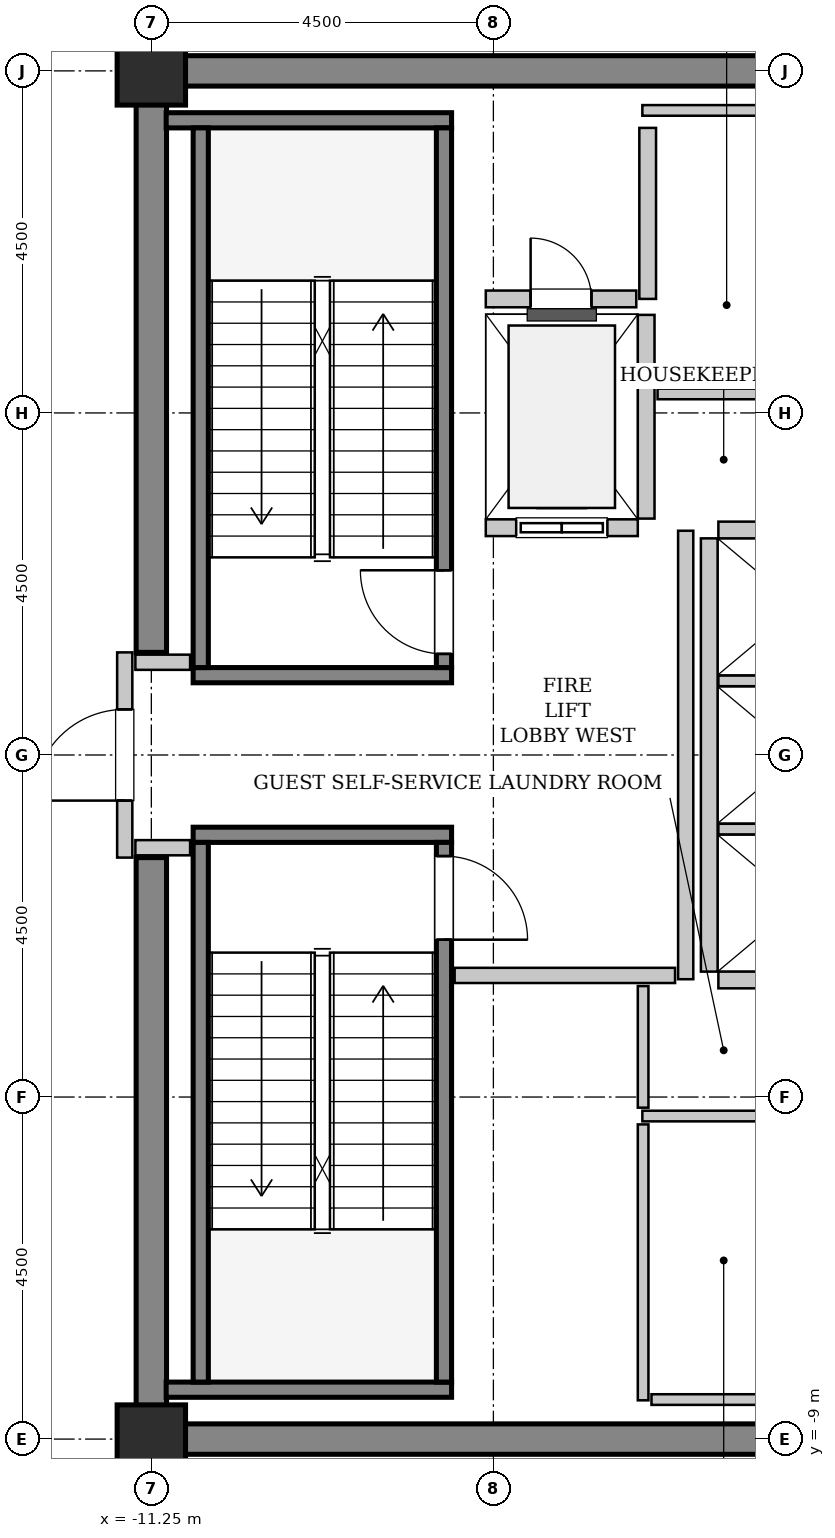
"""IFC4 building model, lengths in metres.
Left out: names, types, materials, properties, quantities, classifications, styles, units other than length and angle.
Written with IfcOpenShell. Run it as: python <this file> out.ifc"""

import sys

from ifc_helpers import new_model, si_unit, direction, frame, frame_2d, origin, origin_2d, place, context, subcontext, project, spatial, rectangle, extrude, source, transform, mapped, element, fill, save


model = new_model("IFC4")
c1 = context("Model", 3, precision=1e-05, world=origin(), true_north=direction((0.0, 1.0)))
c2 = subcontext(c1, "Body", "Model", "MODEL_VIEW")
j1 = project(units=[si_unit("LENGTHUNIT", "METRE"), si_unit("PLANEANGLEUNIT", "RADIAN")], contexts=[c1])
p1 = place(None, origin())
s1 = spatial("IfcSite", under=j1, at=p1, CompositionType="ELEMENT")
p2 = place(p1, origin())
s2 = spatial("IfcBuilding", under=s1, at=p2, CompositionType="ELEMENT")
p3 = place(p2, frame((0.0, 0.0, 349.0)))
s3 = spatial("IfcBuildingStorey", under=s2, at=p3, CompositionType="ELEMENT", Elevation=349.0)
m1 = source(origin(), c2, "Body", "SweptSolid", [
    extrude(rectangle(XDim=9.9, YDim=0.4, at=frame_2d((4.95, 0.0))), origin(), (0.0, 0.0, 1.0), 4.8),
])
for number, where, z_axis, x_axis in (
    (1, (-11.45, 9.0, 0.0), (0.0, 0.0, 1.0), (1.0, 0.0, 0.0)),
    (2, (-11.45, -9.0, 0.0), (0.0, 0.0, 1.0), (1.0, 0.0, 0.0)),
):
    element("IfcWall", number, at=place(p3, frame(where, z_axis=z_axis, x_axis=x_axis)), inside=s3, PredefinedType="SHEAR", context=c2, shape_type="MappedRepresentation", body=[
        mapped(m1, transform((0.0, 0.0, 0.0), x_axis=(1.0, 0.0, 0.0), y_axis=(0.0, 1.0, 0.0), z_axis=(0.0, 0.0, 1.0), scale=1.0)),
    ])
m2 = source(origin(), c2, "Body", "SweptSolid", [
    extrude(rectangle(XDim=7.45, YDim=0.4, at=frame_2d((3.725, 0.0))), origin(), (0.0, 0.0, 1.0), 4.8),
])
for number, where, z_axis, x_axis in (
    (3, (-11.25, -8.8, 0.0), (0.0, 0.0, 1.0), (0.0, 1.0, 0.0)),
    (4, (-11.25, 1.35, 0.0), (0.0, 0.0, 1.0), (0.0, 1.0, 0.0)),
):
    element("IfcWall", number, at=place(p3, frame(where, z_axis=z_axis, x_axis=x_axis)), inside=s3, PredefinedType="SHEAR", context=c2, shape_type="MappedRepresentation", body=[
        mapped(m2, transform((0.0, 0.0, 0.0), x_axis=(1.0, 0.0, 0.0), y_axis=(0.0, 1.0, 0.0), z_axis=(0.0, 0.0, 1.0), scale=1.0)),
    ])
m3 = source(origin(), c2, "Body", "SweptSolid", [
    extrude(rectangle(XDim=0.9, YDim=0.9, at=origin_2d()), origin(), (0.0, 0.0, 1.0), 4.8),
])
for number, where, z_axis, x_axis in (
    (5, (-11.25, -9.0, 0.0), (0.0, 0.0, 1.0), (1.0, 0.0, 0.0)),
    (6, (-11.25, 9.0, 0.0), (0.0, 0.0, 1.0), (1.0, 0.0, 0.0)),
):
    element("IfcColumn", number, at=place(p3, frame(where, z_axis=z_axis, x_axis=x_axis)), inside=s3, PredefinedType="COLUMN", context=c2, shape_type="MappedRepresentation", body=[
        mapped(m3, transform((0.0, 0.0, 0.0), x_axis=(1.0, 0.0, 0.0), y_axis=(0.0, 1.0, 0.0), z_axis=(0.0, 0.0, 1.0), scale=1.0)),
    ])
m4 = source(origin(), c2, "Body", "SweptSolid", [
    extrude(rectangle(XDim=3.4, YDim=0.2, at=frame_2d((1.7, 0.0))), origin(), (0.0, 0.0, 1.0), 4.8),
])
p4 = place(p3, frame((-7.3, 1.05, 0.0), z_axis=(0.0, 0.0, 1.0), x_axis=(-1.0, 0.0, 0.0)))
e7 = element("IfcWall", 7, at=p4, inside=s3, PredefinedType="SOLIDWALL", context=c2, shape_type="MappedRepresentation", body=[
    mapped(m4, transform((0.0, 0.0, 0.0), x_axis=(1.0, 0.0, 0.0), y_axis=(0.0, 1.0, 0.0), z_axis=(0.0, 0.0, 1.0), scale=1.0)),
])
m5 = source(origin(), c2, "Body", "SweptSolid", [
    extrude(rectangle(XDim=3.755, YDim=0.2, at=frame_2d((1.877, 0.0))), origin(), (0.0, 0.0, 1.0), 4.8),
])
p5 = place(p3, frame((-7.3, 8.35, 0.0), z_axis=(0.0, 0.0, 1.0), x_axis=(-1.0, 0.0, 0.0)))
e8 = element("IfcWall", 8, at=p5, inside=s3, PredefinedType="SOLIDWALL", context=c2, shape_type="MappedRepresentation", body=[
    mapped(m5, transform((0.0, 0.0, 0.0), x_axis=(1.0, 0.0, 0.0), y_axis=(0.0, 1.0, 0.0), z_axis=(0.0, 0.0, 1.0), scale=1.0)),
])
m6 = source(origin(), c2, "Body", "SweptSolid", [
    extrude(rectangle(XDim=7.1, YDim=0.2, at=frame_2d((3.55, 0.0))), origin(), (0.0, 0.0, 1.0), 4.8),
])
p6 = place(p3, frame((-7.4, 1.15, 0.0), z_axis=(0.0, 0.0, 1.0), x_axis=(0.0, 1.0, 0.0)))
e9 = element("IfcWall", 9, at=p6, inside=s3, PredefinedType="SOLIDWALL", context=c2, shape_type="MappedRepresentation", body=[
    mapped(m6, transform((0.0, 0.0, 0.0), x_axis=(1.0, 0.0, 0.0), y_axis=(0.0, 1.0, 0.0), z_axis=(0.0, 0.0, 1.0), scale=1.0)),
])
p7 = place(p6, frame((0.18, 0.0, 0.0)))
e10 = element("IfcOpeningElement", 10, at=p7, cuts=e9, PredefinedType="OPENING", context=c2, shape_type="SweptSolid", body=[
    extrude(rectangle(XDim=1.1, YDim=2.15, at=frame_2d((0.55, 1.075))), frame((0.0, 0.11, 0.0), z_axis=(0.0, -1.0, 0.0), x_axis=(1.0, 0.0, 0.0)), (0.0, 0.0, 1.0), 0.22),
])
p8 = place(p3, frame((-10.6, 1.15, 0.0), z_axis=(0.0, 0.0, 1.0), x_axis=(0.0, 1.0, 0.0)))
e11 = element("IfcWall", 11, at=p8, inside=s3, PredefinedType="SOLIDWALL", context=c2, shape_type="MappedRepresentation", body=[
    mapped(m6, transform((0.0, 0.0, 0.0), x_axis=(1.0, 0.0, 0.0), y_axis=(0.0, 1.0, 0.0), z_axis=(0.0, 0.0, 1.0), scale=1.0)),
])
p9 = place(p3, frame((-10.7, -1.05, 0.0), z_axis=(0.0, 0.0, 1.0), x_axis=(1.0, 0.0, 0.0)))
e12 = element("IfcWall", 12, at=p9, inside=s3, PredefinedType="SOLIDWALL", context=c2, shape_type="MappedRepresentation", body=[
    mapped(m4, transform((0.0, 0.0, 0.0), x_axis=(1.0, 0.0, 0.0), y_axis=(0.0, 1.0, 0.0), z_axis=(0.0, 0.0, 1.0), scale=1.0)),
])
p10 = place(p3, frame((-11.055, -8.35, 0.0), z_axis=(0.0, 0.0, 1.0), x_axis=(1.0, 0.0, 0.0)))
e13 = element("IfcWall", 13, at=p10, inside=s3, PredefinedType="SOLIDWALL", context=c2, shape_type="MappedRepresentation", body=[
    mapped(m5, transform((0.0, 0.0, 0.0), x_axis=(1.0, 0.0, 0.0), y_axis=(0.0, 1.0, 0.0), z_axis=(0.0, 0.0, 1.0), scale=1.0)),
])
p11 = place(p3, frame((-10.6, -1.15, 0.0), z_axis=(0.0, 0.0, 1.0), x_axis=(0.0, -1.0, 0.0)))
e14 = element("IfcWall", 14, at=p11, inside=s3, PredefinedType="SOLIDWALL", context=c2, shape_type="MappedRepresentation", body=[
    mapped(m6, transform((0.0, 0.0, 0.0), x_axis=(1.0, 0.0, 0.0), y_axis=(0.0, 1.0, 0.0), z_axis=(0.0, 0.0, 1.0), scale=1.0)),
])
p12 = place(p3, frame((-7.4, -1.15, 0.0), z_axis=(0.0, 0.0, 1.0), x_axis=(0.0, -1.0, 0.0)))
e15 = element("IfcWall", 15, at=p12, inside=s3, PredefinedType="SOLIDWALL", context=c2, shape_type="MappedRepresentation", body=[
    mapped(m6, transform((0.0, 0.0, 0.0), x_axis=(1.0, 0.0, 0.0), y_axis=(0.0, 1.0, 0.0), z_axis=(0.0, 0.0, 1.0), scale=1.0)),
])
p13 = place(p12, frame((0.18, 0.0, 0.0)))
e16 = element("IfcOpeningElement", 16, at=p13, cuts=e15, PredefinedType="OPENING", context=c2, shape_type="SweptSolid", body=[
    extrude(rectangle(XDim=1.1, YDim=2.15, at=frame_2d((0.55, 1.075))), frame((0.0, 0.11, 0.0), z_axis=(0.0, -1.0, 0.0), x_axis=(1.0, 0.0, 0.0)), (0.0, 0.0, 1.0), 0.22),
])
m7 = source(origin(), c2, "Body", "SweptSolid", [
    extrude(rectangle(XDim=2.0, YDim=0.22, at=frame_2d((1.0, 0.0))), origin(), (0.0, 0.0, 1.0), 4.485),
])
p14 = place(p3, frame((-6.85, 2.99, 0.0), z_axis=(0.0, 0.0, 1.0), x_axis=(1.0, 0.0, 0.0)))
e17 = element("IfcWall", 17, at=p14, inside=s3, PredefinedType="SOLIDWALL", context=c2, shape_type="MappedRepresentation", body=[
    mapped(m7, transform((0.0, 0.0, 0.0), x_axis=(1.0, 0.0, 0.0), y_axis=(0.0, 1.0, 0.0), z_axis=(0.0, 0.0, 1.0), scale=1.0)),
])
p15 = place(p14, frame((0.4, 0.0, 0.0)))
e18 = element("IfcOpeningElement", 18, at=p15, cuts=e17, PredefinedType="OPENING", context=c2, shape_type="SweptSolid", body=[
    extrude(rectangle(XDim=1.2, YDim=2.2, at=frame_2d((0.6, 1.1))), frame((0.0, 0.12, 0.0), z_axis=(0.0, -1.0, 0.0), x_axis=(1.0, 0.0, 0.0)), (0.0, 0.0, 1.0), 0.24),
])
m8 = source(origin(), c2, "Body", "SweptSolid", [
    extrude(rectangle(XDim=2.68, YDim=0.22, at=frame_2d((1.34, 0.0))), origin(), (0.0, 0.0, 1.0), 4.485),
])
p16 = place(p3, frame((-4.74, 3.11, 0.0), z_axis=(0.0, 0.0, 1.0), x_axis=(0.0, 1.0, 0.0)))
e19 = element("IfcWall", 19, at=p16, inside=s3, PredefinedType="SOLIDWALL", context=c2, shape_type="MappedRepresentation", body=[
    mapped(m8, transform((0.0, 0.0, 0.0), x_axis=(1.0, 0.0, 0.0), y_axis=(0.0, 1.0, 0.0), z_axis=(0.0, 0.0, 1.0), scale=1.0)),
])
m9 = source(origin(), c2, "Body", "SweptSolid", [
    extrude(rectangle(XDim=5.7, YDim=0.22, at=frame_2d((2.85, 0.0))), origin(), (0.0, 0.0, 1.0), 4.485),
])
p17 = place(p3, frame((-3.91, 2.85, 0.0), z_axis=(0.0, 0.0, 1.0), x_axis=(0.0, -1.0, 0.0)))
e20 = element("IfcWall", 20, at=p17, inside=s3, PredefinedType="SOLIDWALL", context=c2, shape_type="MappedRepresentation", body=[
    mapped(m9, transform((0.0, 0.0, 0.0), x_axis=(1.0, 0.0, 0.0), y_axis=(0.0, 1.0, 0.0), z_axis=(0.0, 0.0, 1.0), scale=1.0)),
])
m10 = source(origin(), c2, "Body", "SweptSolid", [
    extrude(rectangle(XDim=2.13, YDim=0.22, at=frame_2d((1.065, 0.0))), origin(), (0.0, 0.0, 1.0), 4.485),
])
p18 = place(p3, frame((-3.79, -2.96, 0.0), z_axis=(0.0, 0.0, 1.0), x_axis=(1.0, 0.0, 0.0)))
e21 = element("IfcWall", 21, at=p18, inside=s3, PredefinedType="SOLIDWALL", context=c2, shape_type="MappedRepresentation", body=[
    mapped(m10, transform((0.0, 0.0, 0.0), x_axis=(1.0, 0.0, 0.0), y_axis=(0.0, 1.0, 0.0), z_axis=(0.0, 0.0, 1.0), scale=1.0)),
])
m11 = source(origin(), c2, "Body", "SweptSolid", [
    extrude(rectangle(XDim=2.13, YDim=0.14, at=frame_2d((1.065, 0.0))), origin(), (0.0, 0.0, 1.0), 4.485),
])
for number, where, z_axis, x_axis in (
    (22, (-3.79, -0.975, 0.0), (0.0, 0.0, 1.0), (1.0, 0.0, 0.0)),
    (23, (-3.79, 0.975, 0.0), (0.0, 0.0, 1.0), (1.0, 0.0, 0.0)),
):
    element("IfcWall", number, at=place(p3, frame(where, z_axis=z_axis, x_axis=x_axis)), inside=s3, PredefinedType="PARTITIONING", context=c2, shape_type="MappedRepresentation", body=[
        mapped(m11, transform((0.0, 0.0, 0.0), x_axis=(1.0, 0.0, 0.0), y_axis=(0.0, 1.0, 0.0), z_axis=(0.0, 0.0, 1.0), scale=1.0)),
    ])
p19 = place(p3, frame((-1.66, 2.96, 0.0), z_axis=(0.0, 0.0, 1.0), x_axis=(-1.0, 0.0, 0.0)))
e24 = element("IfcWall", 24, at=p19, inside=s3, PredefinedType="SOLIDWALL", context=c2, shape_type="MappedRepresentation", body=[
    mapped(m10, transform((0.0, 0.0, 0.0), x_axis=(1.0, 0.0, 0.0), y_axis=(0.0, 1.0, 0.0), z_axis=(0.0, 0.0, 1.0), scale=1.0)),
])
m12 = source(origin(), c2, "Body", "SweptSolid", [
    extrude(rectangle(XDim=2.25, YDim=0.22, at=frame_2d((1.125, 0.0))), origin(), (0.0, 0.0, 1.0), 4.485),
])
p20 = place(p3, frame((-4.72, 6.0, 0.0), z_axis=(0.0, 0.0, 1.0), x_axis=(0.0, 1.0, 0.0)))
e25 = element("IfcWall", 25, at=p20, inside=s3, PredefinedType="SOLIDWALL", context=c2, shape_type="MappedRepresentation", body=[
    mapped(m12, transform((0.0, 0.0, 0.0), x_axis=(1.0, 0.0, 0.0), y_axis=(0.0, 1.0, 0.0), z_axis=(0.0, 0.0, 1.0), scale=1.0)),
])
m13 = source(origin(), c2, "Body", "SweptSolid", [
    extrude(rectangle(XDim=1.98, YDim=0.22, at=frame_2d((0.99, 0.0))), origin(), (0.0, 0.0, 1.0), 4.485),
])
p21 = place(p3, frame((-6.85, 6.0, 0.0), z_axis=(0.0, 0.0, 1.0), x_axis=(1.0, 0.0, 0.0)))
e26 = element("IfcWall", 26, at=p21, inside=s3, PredefinedType="SOLIDWALL", context=c2, shape_type="MappedRepresentation", body=[
    mapped(m13, transform((0.0, 0.0, 0.0), x_axis=(1.0, 0.0, 0.0), y_axis=(0.0, 1.0, 0.0), z_axis=(0.0, 0.0, 1.0), scale=1.0)),
])
p22 = place(p21, frame((0.59, 0.0, 0.0)))
e27 = element("IfcOpeningElement", 27, at=p22, cuts=e26, PredefinedType="OPENING", context=c2, shape_type="SweptSolid", body=[
    extrude(rectangle(XDim=0.8, YDim=2.0, at=frame_2d((0.4, 1.0))), frame((0.0, 0.12, 0.0), z_axis=(0.0, -1.0, 0.0), x_axis=(1.0, 0.0, 0.0)), (0.0, 0.0, 1.0), 0.24),
])
m14 = source(origin(), c2, "Body", "SweptSolid", [
    extrude(rectangle(XDim=2.7, YDim=0.2, at=frame_2d((1.35, 0.0))), origin(), (0.0, 0.0, 1.0), 3.575),
])
p23 = place(p3, frame((-11.6, -1.35, 0.0), z_axis=(0.0, 0.0, 1.0), x_axis=(0.0, 1.0, 0.0)))
e28 = element("IfcWall", 28, at=p23, inside=s3, PredefinedType="PARTITIONING", context=c2, shape_type="MappedRepresentation", body=[
    mapped(m14, transform((0.0, 0.0, 0.0), x_axis=(1.0, 0.0, 0.0), y_axis=(0.0, 1.0, 0.0), z_axis=(0.0, 0.0, 1.0), scale=1.0)),
])
p24 = place(p23, frame((0.75, 0.0, 0.0)))
e29 = element("IfcOpeningElement", 29, at=p24, cuts=e28, PredefinedType="OPENING", context=c2, shape_type="SweptSolid", body=[
    extrude(rectangle(XDim=1.2, YDim=2.15, at=frame_2d((0.6, 1.075))), frame((0.0, 0.11, 0.0), z_axis=(0.0, -1.0, 0.0), x_axis=(1.0, 0.0, 0.0)), (0.0, 0.0, 1.0), 0.22),
])
m15 = source(origin(), c2, "Body", "SweptSolid", [
    extrude(rectangle(XDim=5.9, YDim=0.2, at=frame_2d((2.95, 0.0))), origin(), (0.0, 0.0, 1.0), 4.485),
])
p25 = place(p3, frame((-4.22, -2.95, 0.0), z_axis=(0.0, 0.0, 1.0), x_axis=(0.0, 1.0, 0.0)))
e30 = element("IfcWall", 30, at=p25, inside=s3, PredefinedType="PARTITIONING", context=c2, shape_type="MappedRepresentation", body=[
    mapped(m15, transform((0.0, 0.0, 0.0), x_axis=(1.0, 0.0, 0.0), y_axis=(0.0, 1.0, 0.0), z_axis=(0.0, 0.0, 1.0), scale=1.0)),
])
m16 = source(origin(), c2, "Body", "SweptSolid", [
    extrude(rectangle(XDim=2.9, YDim=0.2, at=frame_2d((1.45, 0.0))), origin(), (0.0, 0.0, 1.0), 4.485),
])
p26 = place(p3, frame((-7.26, -2.9, 0.0), z_axis=(0.0, 0.0, 1.0), x_axis=(1.0, 0.0, 0.0)))
e31 = element("IfcWall", 31, at=p26, inside=s3, PredefinedType="PARTITIONING", context=c2, shape_type="MappedRepresentation", body=[
    mapped(m16, transform((0.0, 0.0, 0.0), x_axis=(1.0, 0.0, 0.0), y_axis=(0.0, 1.0, 0.0), z_axis=(0.0, 0.0, 1.0), scale=1.0)),
])
m17 = source(origin(), c2, "Body", "SweptSolid", [
    extrude(rectangle(XDim=0.72, YDim=0.2, at=frame_2d((0.36, 0.0))), origin(), (0.0, 0.0, 1.0), 4.485),
])
for number, where, z_axis, x_axis in (
    (32, (-11.46, 1.22, 0.0), (0.0, 0.0, 1.0), (1.0, 0.0, 0.0)),
    (33, (-11.46, -1.22, 0.0), (0.0, 0.0, 1.0), (1.0, 0.0, 0.0)),
):
    element("IfcWall", number, at=place(p3, frame(where, z_axis=z_axis, x_axis=x_axis)), inside=s3, PredefinedType="PARTITIONING", context=c2, shape_type="MappedRepresentation", body=[
        mapped(m17, transform((0.0, 0.0, 0.0), x_axis=(1.0, 0.0, 0.0), y_axis=(0.0, 1.0, 0.0), z_axis=(0.0, 0.0, 1.0), scale=1.0)),
    ])
m18 = source(origin(), c2, "Body", "SweptSolid", [
    extrude(rectangle(XDim=2.95, YDim=0.14, at=frame_2d((1.475, 0.0))), origin(), (0.0, 0.0, 1.0), 4.485),
])
p27 = place(p3, frame((-4.59, 4.75, 0.0), z_axis=(0.0, 0.0, 1.0), x_axis=(1.0, 0.0, 0.0)))
e34 = element("IfcWall", 34, at=p27, inside=s3, PredefinedType="PARTITIONING", context=c2, shape_type="MappedRepresentation", body=[
    mapped(m18, transform((0.0, 0.0, 0.0), x_axis=(1.0, 0.0, 0.0), y_axis=(0.0, 1.0, 0.0), z_axis=(0.0, 0.0, 1.0), scale=1.0)),
])
m19 = source(origin(), c2, "Body", "SweptSolid", [
    extrude(rectangle(XDim=3.15, YDim=0.14, at=frame_2d((1.575, 0.0))), origin(), (0.0, 0.0, 1.0), 4.485),
])
for number, where, z_axis, x_axis in (
    (35, (-4.79, 8.48, 0.0), (0.0, 0.0, 1.0), (1.0, 0.0, 0.0)),
    (36, (-4.79, -4.75, 0.0), (0.0, 0.0, 1.0), (1.0, 0.0, 0.0)),
):
    element("IfcWall", number, at=place(p3, frame(where, z_axis=z_axis, x_axis=x_axis)), inside=s3, PredefinedType="PARTITIONING", context=c2, shape_type="MappedRepresentation", body=[
        mapped(m19, transform((0.0, 0.0, 0.0), x_axis=(1.0, 0.0, 0.0), y_axis=(0.0, 1.0, 0.0), z_axis=(0.0, 0.0, 1.0), scale=1.0)),
    ])
m20 = source(origin(), c2, "Body", "SweptSolid", [
    extrude(rectangle(XDim=1.6, YDim=0.14, at=frame_2d((0.8, 0.0))), origin(), (0.0, 0.0, 1.0), 4.485),
])
p28 = place(p3, frame((-4.78, -4.64, 0.0), z_axis=(0.0, 0.0, 1.0), x_axis=(0.0, 1.0, 0.0)))
e37 = element("IfcWall", 37, at=p28, inside=s3, PredefinedType="PARTITIONING", context=c2, shape_type="MappedRepresentation", body=[
    mapped(m20, transform((0.0, 0.0, 0.0), x_axis=(1.0, 0.0, 0.0), y_axis=(0.0, 1.0, 0.0), z_axis=(0.0, 0.0, 1.0), scale=1.0)),
])
m21 = source(origin(), c2, "Body", "SweptSolid", [
    extrude(rectangle(XDim=3.63, YDim=0.14, at=frame_2d((1.815, 0.0))), origin(), (0.0, 0.0, 1.0), 4.485),
])
p29 = place(p3, frame((-4.78, -8.49, 0.0), z_axis=(0.0, 0.0, 1.0), x_axis=(0.0, 1.0, 0.0)))
e38 = element("IfcWall", 38, at=p29, inside=s3, PredefinedType="PARTITIONING", context=c2, shape_type="MappedRepresentation", body=[
    mapped(m21, transform((0.0, 0.0, 0.0), x_axis=(1.0, 0.0, 0.0), y_axis=(0.0, 1.0, 0.0), z_axis=(0.0, 0.0, 1.0), scale=1.0)),
])
m22 = source(origin(), c2, "Body", "SweptSolid", [
    extrude(rectangle(XDim=3.03, YDim=0.14, at=frame_2d((1.515, 0.0))), origin(), (0.0, 0.0, 1.0), 4.485),
])
p30 = place(p3, frame((-4.67, -8.48, 0.0), z_axis=(0.0, 0.0, 1.0), x_axis=(1.0, 0.0, 0.0)))
e39 = element("IfcWall", 39, at=p30, inside=s3, PredefinedType="PARTITIONING", context=c2, shape_type="MappedRepresentation", body=[
    mapped(m22, transform((0.0, 0.0, 0.0), x_axis=(1.0, 0.0, 0.0), y_axis=(0.0, 1.0, 0.0), z_axis=(0.0, 0.0, 1.0), scale=1.0)),
])
m23 = source(origin(), c2, "Body", "SweptSolid", [
    extrude(rectangle(XDim=1.1, YDim=2.15, at=frame_2d((0.55, 1.075))), frame((0.0, 0.025, 0.0), z_axis=(0.0, -1.0, 0.0), x_axis=(1.0, 0.0, 0.0)), (0.0, 0.0, 1.0), 0.05),
])
p31 = place(p7, origin())
e40 = element("IfcDoor", 40, at=p31, inside=s3, OperationType="SINGLE_SWING_RIGHT", PredefinedType="DOOR", context=c2, shape_type="MappedRepresentation", body=[
    mapped(m23, transform((0.0, 0.0, 0.0), x_axis=(1.0, 0.0, 0.0), y_axis=(0.0, 1.0, 0.0), z_axis=(0.0, 0.0, 1.0), scale=1.0)),
])
fill(e10, e40)
p32 = place(p13, origin())
e41 = element("IfcDoor", 41, at=p32, inside=s3, OperationType="SINGLE_SWING_RIGHT", PredefinedType="DOOR", context=c2, shape_type="MappedRepresentation", body=[
    mapped(m23, transform((0.0, 0.0, 0.0), x_axis=(1.0, 0.0, 0.0), y_axis=(0.0, 1.0, 0.0), z_axis=(0.0, 0.0, 1.0), scale=1.0)),
])
fill(e16, e41)
m24 = source(origin(), c2, "Body", "SweptSolid", [
    extrude(rectangle(XDim=1.2, YDim=2.2, at=frame_2d((0.6, 1.1))), frame((0.0, 0.025, 0.0), z_axis=(0.0, -1.0, 0.0), x_axis=(1.0, 0.0, 0.0)), (0.0, 0.0, 1.0), 0.05),
])
p33 = place(p15, origin())
e42 = element("IfcDoor", 42, at=p33, inside=s3, OperationType="SLIDING_TO_LEFT", PredefinedType="DOOR", context=c2, shape_type="MappedRepresentation", body=[
    mapped(m24, transform((0.0, 0.0, 0.0), x_axis=(1.0, 0.0, 0.0), y_axis=(0.0, 1.0, 0.0), z_axis=(0.0, 0.0, 1.0), scale=1.0)),
])
fill(e18, e42)
m25 = source(origin(), c2, "Body", "SweptSolid", [
    extrude(rectangle(XDim=0.8, YDim=2.0, at=frame_2d((0.4, 1.0))), frame((0.0, 0.025, 0.0), z_axis=(0.0, -1.0, 0.0), x_axis=(1.0, 0.0, 0.0)), (0.0, 0.0, 1.0), 0.05),
])
p34 = place(p22, origin())
e43 = element("IfcDoor", 43, at=p34, inside=s3, OperationType="SINGLE_SWING_LEFT", PredefinedType="TRAPDOOR", context=c2, shape_type="MappedRepresentation", body=[
    mapped(m25, transform((0.0, 0.0, 0.0), x_axis=(1.0, 0.0, 0.0), y_axis=(0.0, 1.0, 0.0), z_axis=(0.0, 0.0, 1.0), scale=1.0)),
])
fill(e27, e43)
m26 = source(origin(), c2, "Body", "SweptSolid", [
    extrude(rectangle(XDim=1.2, YDim=2.15, at=frame_2d((0.6, 1.075))), frame((0.0, 0.025, 0.0), z_axis=(0.0, -1.0, 0.0), x_axis=(1.0, 0.0, 0.0)), (0.0, 0.0, 1.0), 0.05),
])
p35 = place(p24, origin())
e44 = element("IfcDoor", 44, at=p35, inside=s3, OperationType="SINGLE_SWING_LEFT", PredefinedType="DOOR", context=c2, shape_type="MappedRepresentation", body=[
    mapped(m26, transform((0.0, 0.0, 0.0), x_axis=(1.0, 0.0, 0.0), y_axis=(0.0, 1.0, 0.0), z_axis=(0.0, 0.0, 1.0), scale=1.0)),
])
fill(e29, e44)
save(model, sys.argv[1])
